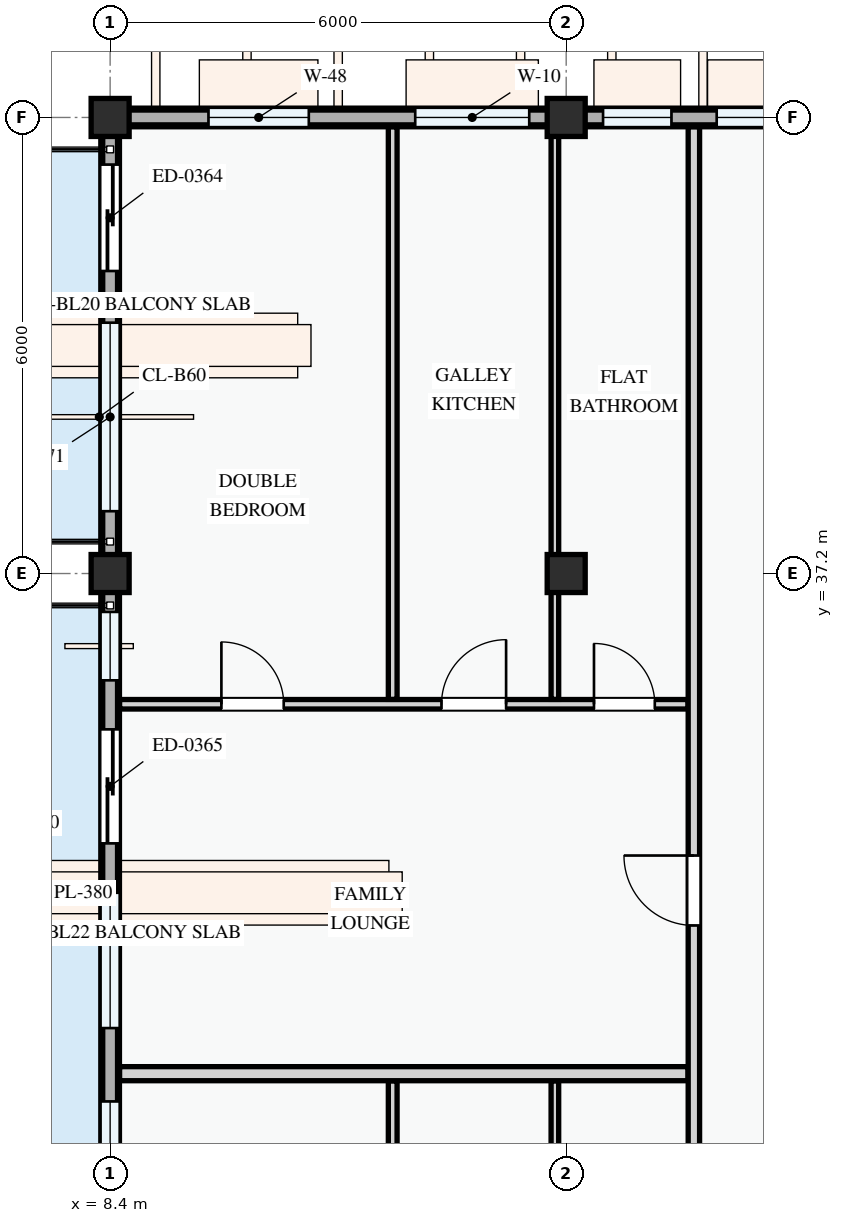
"""IFC4 building model, lengths in metres.
Left out: names, types, materials, properties, quantities, classifications, styles, units other than length and angle.
Written with IfcOpenShell. Run it as: python <this file> out.ifc"""

import sys

from ifc_helpers import new_model, si_unit, direction, frame, frame_2d, origin, origin_2d, place, context, subcontext, project, spatial, polyline, rectangle, outline, extrude, element, fill, save


model = new_model("IFC4")
c1 = context("Model", 3, precision=1e-05, world=origin(), true_north=direction((0.0, 1.0)))
c2 = subcontext(c1, "Body", "Model", "MODEL_VIEW")
j1 = project(units=[si_unit("LENGTHUNIT", "METRE"), si_unit("PLANEANGLEUNIT", "RADIAN")], contexts=[c1])
p1 = place(None, origin())
s1 = spatial("IfcSite", under=j1, at=p1, CompositionType="ELEMENT")
p2 = place(p1, origin())
s2 = spatial("IfcBuilding", under=s1, at=p2, CompositionType="ELEMENT")
p3 = place(p2, frame((0.0, 0.0, 34.5)))
s3 = spatial("IfcBuildingStorey", under=s2, at=p3, CompositionType="ELEMENT", Elevation=34.5)
for number, where, z_axis, x_axis in (
    (1, (8.4, 37.2, 0.0), (0.0, 0.0, 1.0), (1.0, 0.0, 0.0)),
    (2, (8.4, 43.2, 0.0), (0.0, 0.0, 1.0), (1.0, 0.0, 0.0)),
    (3, (14.4, 37.2, 0.0), (0.0, 0.0, 1.0), (1.0, 0.0, 0.0)),
    (4, (14.4, 43.2, 0.0), (0.0, 0.0, 1.0), (1.0, 0.0, 0.0)),
):
    element("IfcColumn", number, at=place(p3, frame(where, z_axis=z_axis, x_axis=x_axis)), inside=s3, PredefinedType="COLUMN", context=c2, shape_type="SweptSolid", body=[
        extrude(rectangle(XDim=0.5, YDim=0.5, at=origin_2d()), origin(), (0.0, 0.0, 1.0), 3.3),
    ])
p4 = place(p3, frame((22.8, 43.2, 0.0), z_axis=(0.0, 0.0, 1.0), x_axis=(-1.0, 0.0, 0.0)))
e5 = element("IfcWall", 5, at=p4, inside=s3, PredefinedType="STANDARD", context=c2, shape_type="SweptSolid", body=[
    extrude(rectangle(XDim=8.4, YDim=0.245, at=frame_2d((4.2, 0.0))), origin(), (0.0, 0.0, 1.0), 2.375),
])
p5 = place(p4, frame((0.817, 0.0, 0.78)))
e6 = element("IfcOpeningElement", 6, at=p5, cuts=e5, PredefinedType="OPENING", context=c2, shape_type="SweptSolid", body=[
    extrude(rectangle(XDim=0.9, YDim=1.2, at=frame_2d((0.45, 0.6))), frame((0.0, 0.133, 0.0), z_axis=(0.0, -1.0, 0.0), x_axis=(1.0, 0.0, 0.0)), (0.0, 0.0, 1.0), 0.265),
])
p6 = place(p4, frame((5.12, 0.0, 0.78)))
e7 = element("IfcOpeningElement", 7, at=p6, cuts=e5, PredefinedType="OPENING", context=c2, shape_type="SweptSolid", body=[
    extrude(rectangle(XDim=1.3, YDim=1.4, at=frame_2d((0.65, 0.7))), frame((0.0, 0.133, 0.0), z_axis=(0.0, -1.0, 0.0), x_axis=(1.0, 0.0, 0.0)), (0.0, 0.0, 1.0), 0.265),
])
p7 = place(p4, frame((7.015, 0.0, 0.78)))
e8 = element("IfcOpeningElement", 8, at=p7, cuts=e5, PredefinedType="OPENING", context=c2, shape_type="SweptSolid", body=[
    extrude(rectangle(XDim=0.9, YDim=1.2, at=frame_2d((0.45, 0.6))), frame((0.0, 0.133, 0.0), z_axis=(0.0, -1.0, 0.0), x_axis=(1.0, 0.0, 0.0)), (0.0, 0.0, 1.0), 0.265),
])
p8 = place(p3, frame((14.4, 43.2, 0.0), z_axis=(0.0, 0.0, 1.0), x_axis=(-1.0, 0.0, 0.0)))
e9 = element("IfcWall", 9, at=p8, inside=s3, PredefinedType="STANDARD", context=c2, shape_type="SweptSolid", body=[
    extrude(rectangle(XDim=6.0, YDim=0.245, at=frame_2d((3.0, 0.0))), origin(), (0.0, 0.0, 1.0), 2.525),
])
p9 = place(p8, frame((0.486, 0.0, 0.78)))
e10 = element("IfcOpeningElement", 10, at=p9, cuts=e9, PredefinedType="OPENING", context=c2, shape_type="SweptSolid", body=[
    extrude(rectangle(XDim=1.5, YDim=1.5, at=frame_2d((0.75, 0.75))), frame((0.0, 0.133, 0.0), z_axis=(0.0, -1.0, 0.0), x_axis=(1.0, 0.0, 0.0)), (0.0, 0.0, 1.0), 0.265),
])
p10 = place(p8, frame((3.386, 0.0, 0.78)))
e11 = element("IfcOpeningElement", 11, at=p10, cuts=e9, PredefinedType="OPENING", context=c2, shape_type="SweptSolid", body=[
    extrude(rectangle(XDim=1.32, YDim=1.35, at=frame_2d((0.66, 0.675))), frame((0.0, 0.133, 0.0), z_axis=(0.0, -1.0, 0.0), x_axis=(1.0, 0.0, 0.0)), (0.0, 0.0, 1.0), 0.265),
])
p11 = place(p3, frame((8.4, 43.2, 0.0), z_axis=(0.0, 0.0, 1.0), x_axis=(0.0, -1.0, 0.0)))
e12 = element("IfcWall", 12, at=p11, inside=s3, PredefinedType="STANDARD", context=c2, shape_type="SweptSolid", body=[
    extrude(rectangle(XDim=6.0, YDim=0.245, at=frame_2d((3.0, 0.0))), origin(), (0.0, 0.0, 1.0), 2.445),
])
p12 = place(p11, frame((0.62, 0.0, 0.0)))
e13 = element("IfcOpeningElement", 13, at=p12, cuts=e12, PredefinedType="OPENING", context=c2, shape_type="SweptSolid", body=[
    extrude(rectangle(XDim=1.4, YDim=2.2, at=frame_2d((0.7, 1.1))), frame((0.0, 0.133, 0.0), z_axis=(0.0, -1.0, 0.0), x_axis=(1.0, 0.0, 0.0)), (0.0, 0.0, 1.0), 0.265),
])
p13 = place(p11, frame((2.7, 0.0, 0.78)))
e14 = element("IfcOpeningElement", 14, at=p13, cuts=e12, PredefinedType="OPENING", context=c2, shape_type="SweptSolid", body=[
    extrude(rectangle(XDim=2.48, YDim=1.46, at=frame_2d((1.24, 0.73))), frame((0.0, 0.133, 0.0), z_axis=(0.0, -1.0, 0.0), x_axis=(1.0, 0.0, 0.0)), (0.0, 0.0, 1.0), 0.265),
])
p14 = place(p3, frame((8.4, 37.2, 0.0), z_axis=(0.0, 0.0, 1.0), x_axis=(0.0, -1.0, 0.0)))
e15 = element("IfcWall", 15, at=p14, inside=s3, PredefinedType="STANDARD", context=c2, shape_type="SweptSolid", body=[
    extrude(rectangle(XDim=8.4, YDim=0.245, at=frame_2d((4.2, 0.0))), origin(), (0.0, 0.0, 1.0), 2.345),
])
p15 = place(p14, frame((2.05, 0.0, 0.0)))
e16 = element("IfcOpeningElement", 16, at=p15, cuts=e15, PredefinedType="OPENING", context=c2, shape_type="SweptSolid", body=[
    extrude(rectangle(XDim=1.5, YDim=2.2, at=frame_2d((0.75, 1.1))), frame((0.0, 0.133, 0.0), z_axis=(0.0, -1.0, 0.0), x_axis=(1.0, 0.0, 0.0)), (0.0, 0.0, 1.0), 0.265),
])
p16 = place(p14, frame((0.505, 0.0, 0.78)))
e17 = element("IfcOpeningElement", 17, at=p16, cuts=e15, PredefinedType="OPENING", context=c2, shape_type="SweptSolid", body=[
    extrude(rectangle(XDim=0.9, YDim=1.2, at=frame_2d((0.45, 0.6))), frame((0.0, 0.133, 0.0), z_axis=(0.0, -1.0, 0.0), x_axis=(1.0, 0.0, 0.0)), (0.0, 0.0, 1.0), 0.265),
])
p17 = place(p14, frame((4.2, 0.0, 0.78)))
e18 = element("IfcOpeningElement", 18, at=p17, cuts=e15, PredefinedType="OPENING", context=c2, shape_type="SweptSolid", body=[
    extrude(rectangle(XDim=1.78, YDim=1.42, at=frame_2d((0.89, 0.71))), frame((0.0, 0.133, 0.0), z_axis=(0.0, -1.0, 0.0), x_axis=(1.0, 0.0, 0.0)), (0.0, 0.0, 1.0), 0.265),
])
p18 = place(p14, frame((6.945, 0.0, 0.78)))
e19 = element("IfcOpeningElement", 19, at=p18, cuts=e15, PredefinedType="OPENING", context=c2, shape_type="SweptSolid", body=[
    extrude(rectangle(XDim=0.9, YDim=1.2, at=frame_2d((0.45, 0.6))), frame((0.0, 0.133, 0.0), z_axis=(0.0, -1.0, 0.0), x_axis=(1.0, 0.0, 0.0)), (0.0, 0.0, 1.0), 0.265),
])
p19 = place(p3, frame((22.8, 43.2, 3.3), z_axis=(0.0, 0.0, 1.0), x_axis=(-1.0, 0.0, 0.0)))
e20 = element("IfcWall", 20, at=p19, inside=s3, PredefinedType="PARAPET", context=c2, shape_type="SweptSolid", body=[
    extrude(rectangle(XDim=14.4, YDim=0.195, at=frame_2d((7.2, 0.0))), origin(), (0.0, 0.0, 1.0), 1.15),
])
p20 = place(p3, frame((8.4, 43.2, 3.3), z_axis=(0.0, 0.0, 1.0), x_axis=(0.0, -1.0, 0.0)))
e21 = element("IfcWall", 21, at=p20, inside=s3, PredefinedType="PARAPET", context=c2, shape_type="SweptSolid", body=[
    extrude(outline(polyline([(0.0, 0.0), (6.0, 0.0), (6.0, 1.12), (5.5, 1.322), (5.0, 1.484), (4.5, 1.618), (4.0, 1.717), (3.5, 1.779), (3.0, 1.8), (2.5, 1.779), (2.0, 1.717), (1.5, 1.618), (1.0, 1.484), (0.5, 1.322), (0.0, 1.12), (0.0, 0.0)])), frame((0.0, 0.098, 0.0), z_axis=(0.0, -1.0, 0.0), x_axis=(1.0, 0.0, 0.0)), (0.0, 0.0, 1.0), 0.195),
])
p21 = place(p3, frame((8.4, 37.2, 3.3), z_axis=(0.0, 0.0, 1.0), x_axis=(0.0, -1.0, 0.0)))
e22 = element("IfcWall", 22, at=p21, inside=s3, PredefinedType="PARAPET", context=c2, shape_type="SweptSolid", body=[
    extrude(outline(polyline([(0.0, 0.0), (8.4, 0.0), (8.4, 1.12), (7.7, 1.322), (7.0, 1.484), (6.3, 1.618), (5.6, 1.717), (4.9, 1.779), (4.2, 1.8), (3.5, 1.779), (2.8, 1.717), (2.1, 1.618), (1.4, 1.484), (0.7, 1.322), (0.0, 1.12), (0.0, 0.0)])), frame((0.0, 0.098, 0.0), z_axis=(0.0, -1.0, 0.0), x_axis=(1.0, 0.0, 0.0)), (0.0, 0.0, 1.0), 0.195),
])
p22 = place(p3, frame((12.118, 26.705, 0.0), z_axis=(0.0, 0.0, 1.0), x_axis=(0.0, 1.0, 0.0)))
e23 = element("IfcWall", 23, at=p22, inside=s3, PredefinedType="PARTITIONING", context=c2, shape_type="SweptSolid", body=[
    extrude(rectangle(XDim=3.821, YDim=0.115, at=frame_2d((1.91, 0.0))), origin(), (0.0, 0.0, 1.0), 3.0),
])
p23 = place(p3, frame((14.251, 26.705, 0.0), z_axis=(0.0, 0.0, 1.0), x_axis=(0.0, 1.0, 0.0)))
e24 = element("IfcWall", 24, at=p23, inside=s3, PredefinedType="PARTITIONING", context=c2, shape_type="SweptSolid", body=[
    extrude(rectangle(XDim=3.821, YDim=0.1, at=frame_2d((1.91, 0.0))), origin(), (0.0, 0.0, 1.0), 2.425),
])
p24 = place(p3, frame((8.524, 35.48, 0.0), z_axis=(0.0, 0.0, 1.0), x_axis=(1.0, 0.0, 0.0)))
e25 = element("IfcWall", 25, at=p24, inside=s3, PredefinedType="PARTITIONING", context=c2, shape_type="SweptSolid", body=[
    extrude(rectangle(XDim=7.479, YDim=0.125, at=frame_2d((3.739, 0.0))), origin(), (0.0, 0.0, 1.0), 3.0),
])
p25 = place(p24, frame((1.339, 0.0, 0.0)))
e26 = element("IfcOpeningElement", 26, at=p25, cuts=e25, PredefinedType="OPENING", context=c2, shape_type="SweptSolid", body=[
    extrude(rectangle(XDim=0.82, YDim=2.08, at=frame_2d((0.41, 1.04))), frame((0.0, 0.073, 0.0), z_axis=(0.0, -1.0, 0.0), x_axis=(1.0, 0.0, 0.0)), (0.0, 0.0, 1.0), 0.145),
])
p26 = place(p24, frame((4.235, 0.0, 0.0)))
e27 = element("IfcOpeningElement", 27, at=p26, cuts=e25, PredefinedType="OPENING", context=c2, shape_type="SweptSolid", body=[
    extrude(rectangle(XDim=0.85, YDim=2.1, at=frame_2d((0.425, 1.05))), frame((0.0, 0.073, 0.0), z_axis=(0.0, -1.0, 0.0), x_axis=(1.0, 0.0, 0.0)), (0.0, 0.0, 1.0), 0.145),
])
p27 = place(p24, frame((6.241, 0.0, 0.0)))
e28 = element("IfcOpeningElement", 28, at=p27, cuts=e25, PredefinedType="OPENING", context=c2, shape_type="SweptSolid", body=[
    extrude(rectangle(XDim=0.8, YDim=2.1, at=frame_2d((0.4, 1.05))), frame((0.0, 0.073, 0.0), z_axis=(0.0, -1.0, 0.0), x_axis=(1.0, 0.0, 0.0)), (0.0, 0.0, 1.0), 0.145),
])
p28 = place(p3, frame((12.118, 35.544, 0.0), z_axis=(0.0, 0.0, 1.0), x_axis=(0.0, 1.0, 0.0)))
e29 = element("IfcWall", 29, at=p28, inside=s3, PredefinedType="PARTITIONING", context=c2, shape_type="SweptSolid", body=[
    extrude(rectangle(XDim=7.531, YDim=0.115, at=frame_2d((3.766, 0.0))), origin(), (0.0, 0.0, 1.0), 3.0),
])
p29 = place(p3, frame((14.251, 35.544, 0.0), z_axis=(0.0, 0.0, 1.0), x_axis=(0.0, 1.0, 0.0)))
e30 = element("IfcWall", 30, at=p29, inside=s3, PredefinedType="PARTITIONING", context=c2, shape_type="SweptSolid", body=[
    extrude(rectangle(XDim=7.531, YDim=0.1, at=frame_2d((3.766, 0.0))), origin(), (0.0, 0.0, 1.0), 2.425),
])
p30 = place(p3, frame((8.524, 30.62, 0.0), z_axis=(0.0, 0.0, 1.0), x_axis=(1.0, 0.0, 0.0)))
e31 = element("IfcWall", 31, at=p30, inside=s3, PredefinedType="PARTITIONING", context=c2, shape_type="SweptSolid", body=[
    extrude(rectangle(XDim=7.479, YDim=0.185, at=frame_2d((3.739, 0.0))), origin(), (0.0, 0.0, 1.0), 3.0),
])
p31 = place(p3, frame((16.08, 22.66, 0.0), z_axis=(0.0, 0.0, 1.0), x_axis=(0.0, 1.0, 0.0)))
e32 = element("IfcWall", 32, at=p31, inside=s3, PredefinedType="PARTITIONING", context=c2, shape_type="SweptSolid", body=[
    extrude(rectangle(XDim=20.416, YDim=0.15, at=frame_2d((10.208, 0.0))), origin(), (0.0, 0.0, 1.0), 3.0),
])
p32 = place(p31, frame((2.691, 0.0, 0.0)))
e33 = element("IfcOpeningElement", 33, at=p32, cuts=e32, PredefinedType="OPENING", context=c2, shape_type="SweptSolid", body=[
    extrude(rectangle(XDim=0.92, YDim=2.1, at=frame_2d((0.46, 1.05))), frame((0.0, 0.085, 0.0), z_axis=(0.0, -1.0, 0.0), x_axis=(1.0, 0.0, 0.0)), (0.0, 0.0, 1.0), 0.17),
])
p33 = place(p31, frame((9.91, 0.0, 0.0)))
e34 = element("IfcOpeningElement", 34, at=p33, cuts=e32, PredefinedType="OPENING", context=c2, shape_type="SweptSolid", body=[
    extrude(rectangle(XDim=0.92, YDim=2.1, at=frame_2d((0.46, 1.05))), frame((0.0, 0.085, 0.0), z_axis=(0.0, -1.0, 0.0), x_axis=(1.0, 0.0, 0.0)), (0.0, 0.0, 1.0), 0.17),
])
p34 = place(p6, origin())
e35 = element("IfcWindow", 35, at=p34, inside=s3, PartitioningType="SINGLE_PANEL", PredefinedType="WINDOW", context=c2, shape_type="SweptSolid", body=[
    extrude(rectangle(XDim=1.3, YDim=1.4, at=frame_2d((0.65, 0.7))), frame((0.0, 0.03, 0.0), z_axis=(0.0, -1.0, 0.0), x_axis=(1.0, 0.0, 0.0)), (0.0, 0.0, 1.0), 0.06),
])
fill(e7, e35)
p35 = place(p7, origin())
e36 = element("IfcWindow", 36, at=p35, inside=s3, PartitioningType="SINGLE_PANEL", PredefinedType="WINDOW", context=c2, shape_type="SweptSolid", body=[
    extrude(rectangle(XDim=0.9, YDim=1.2, at=frame_2d((0.45, 0.6))), frame((0.0, 0.03, 0.0), z_axis=(0.0, -1.0, 0.0), x_axis=(1.0, 0.0, 0.0)), (0.0, 0.0, 1.0), 0.06),
])
fill(e8, e36)
p36 = place(p9, origin())
e37 = element("IfcWindow", 37, at=p36, inside=s3, PartitioningType="SINGLE_PANEL", PredefinedType="WINDOW", context=c2, shape_type="SweptSolid", body=[
    extrude(rectangle(XDim=1.5, YDim=1.5, at=frame_2d((0.75, 0.75))), frame((0.0, 0.03, 0.0), z_axis=(0.0, -1.0, 0.0), x_axis=(1.0, 0.0, 0.0)), (0.0, 0.0, 1.0), 0.06),
])
fill(e10, e37)
p37 = place(p10, origin())
e38 = element("IfcWindow", 38, at=p37, inside=s3, PartitioningType="SINGLE_PANEL", PredefinedType="WINDOW", context=c2, shape_type="SweptSolid", body=[
    extrude(rectangle(XDim=1.32, YDim=1.35, at=frame_2d((0.66, 0.675))), frame((0.0, 0.03, 0.0), z_axis=(0.0, -1.0, 0.0), x_axis=(1.0, 0.0, 0.0)), (0.0, 0.0, 1.0), 0.06),
])
fill(e11, e38)
p38 = place(p12, frame((1.4, 0.0, 0.0), z_axis=(0.0, 0.0, 1.0), x_axis=(-1.0, 0.0, 0.0)))
e39 = element("IfcDoor", 39, at=p38, inside=s3, OperationType="SLIDING_TO_LEFT", PredefinedType="DOOR", context=c2, shape_type="SweptSolid", body=[
    extrude(rectangle(XDim=1.4, YDim=2.2, at=frame_2d((0.7, 1.1))), frame((0.0, 0.025, 0.0), z_axis=(0.0, -1.0, 0.0), x_axis=(1.0, 0.0, 0.0)), (0.0, 0.0, 1.0), 0.05),
])
fill(e13, e39)
p39 = place(p13, origin())
e40 = element("IfcWindow", 40, at=p39, inside=s3, PartitioningType="DOUBLE_PANEL_VERTICAL", PredefinedType="WINDOW", context=c2, shape_type="SweptSolid", body=[
    extrude(rectangle(XDim=2.48, YDim=1.46, at=frame_2d((1.24, 0.73))), frame((0.0, 0.03, 0.0), z_axis=(0.0, -1.0, 0.0), x_axis=(1.0, 0.0, 0.0)), (0.0, 0.0, 1.0), 0.06),
])
fill(e14, e40)
p40 = place(p15, frame((1.5, 0.0, 0.0), z_axis=(0.0, 0.0, 1.0), x_axis=(-1.0, 0.0, 0.0)))
e41 = element("IfcDoor", 41, at=p40, inside=s3, OperationType="SLIDING_TO_RIGHT", PredefinedType="DOOR", context=c2, shape_type="SweptSolid", body=[
    extrude(rectangle(XDim=1.5, YDim=2.2, at=frame_2d((0.75, 1.1))), frame((0.0, 0.025, 0.0), z_axis=(0.0, -1.0, 0.0), x_axis=(1.0, 0.0, 0.0)), (0.0, 0.0, 1.0), 0.05),
])
fill(e16, e41)
p41 = place(p16, origin())
e42 = element("IfcWindow", 42, at=p41, inside=s3, PartitioningType="SINGLE_PANEL", PredefinedType="WINDOW", context=c2, shape_type="SweptSolid", body=[
    extrude(rectangle(XDim=0.9, YDim=1.2, at=frame_2d((0.45, 0.6))), frame((0.0, 0.03, 0.0), z_axis=(0.0, -1.0, 0.0), x_axis=(1.0, 0.0, 0.0)), (0.0, 0.0, 1.0), 0.06),
])
fill(e17, e42)
p42 = place(p17, origin())
e43 = element("IfcWindow", 43, at=p42, inside=s3, PartitioningType="DOUBLE_PANEL_VERTICAL", PredefinedType="WINDOW", context=c2, shape_type="SweptSolid", body=[
    extrude(rectangle(XDim=1.78, YDim=1.42, at=frame_2d((0.89, 0.71))), frame((0.0, 0.03, 0.0), z_axis=(0.0, -1.0, 0.0), x_axis=(1.0, 0.0, 0.0)), (0.0, 0.0, 1.0), 0.06),
])
fill(e18, e43)
p43 = place(p18, origin())
e44 = element("IfcWindow", 44, at=p43, inside=s3, PartitioningType="SINGLE_PANEL", PredefinedType="WINDOW", context=c2, shape_type="SweptSolid", body=[
    extrude(rectangle(XDim=0.9, YDim=1.2, at=frame_2d((0.45, 0.6))), frame((0.0, 0.03, 0.0), z_axis=(0.0, -1.0, 0.0), x_axis=(1.0, 0.0, 0.0)), (0.0, 0.0, 1.0), 0.06),
])
fill(e19, e44)
p44 = place(p25, origin())
e45 = element("IfcDoor", 45, at=p44, inside=s3, OperationType="SINGLE_SWING_LEFT", PredefinedType="DOOR", context=c2, shape_type="SweptSolid", body=[
    extrude(rectangle(XDim=0.82, YDim=2.08, at=frame_2d((0.41, 1.04))), frame((0.0, 0.025, 0.0), z_axis=(0.0, -1.0, 0.0), x_axis=(1.0, 0.0, 0.0)), (0.0, 0.0, 1.0), 0.05),
])
fill(e26, e45)
p45 = place(p26, origin())
e46 = element("IfcDoor", 46, at=p45, inside=s3, OperationType="SINGLE_SWING_RIGHT", PredefinedType="DOOR", context=c2, shape_type="SweptSolid", body=[
    extrude(rectangle(XDim=0.85, YDim=2.1, at=frame_2d((0.425, 1.05))), frame((0.0, 0.025, 0.0), z_axis=(0.0, -1.0, 0.0), x_axis=(1.0, 0.0, 0.0)), (0.0, 0.0, 1.0), 0.05),
])
fill(e27, e46)
p46 = place(p27, origin())
e47 = element("IfcDoor", 47, at=p46, inside=s3, OperationType="SINGLE_SWING_LEFT", PredefinedType="DOOR", context=c2, shape_type="SweptSolid", body=[
    extrude(rectangle(XDim=0.8, YDim=2.1, at=frame_2d((0.4, 1.05))), frame((0.0, 0.025, 0.0), z_axis=(0.0, -1.0, 0.0), x_axis=(1.0, 0.0, 0.0)), (0.0, 0.0, 1.0), 0.05),
])
fill(e28, e47)
p47 = place(p33, origin())
e48 = element("IfcDoor", 48, at=p47, inside=s3, OperationType="SINGLE_SWING_RIGHT", PredefinedType="DOOR", context=c2, shape_type="SweptSolid", body=[
    extrude(rectangle(XDim=0.92, YDim=2.1, at=frame_2d((0.46, 1.05))), frame((0.0, 0.025, 0.0), z_axis=(0.0, -1.0, 0.0), x_axis=(1.0, 0.0, 0.0)), (0.0, 0.0, 1.0), 0.05),
])
fill(e34, e48)
save(model, sys.argv[1])
